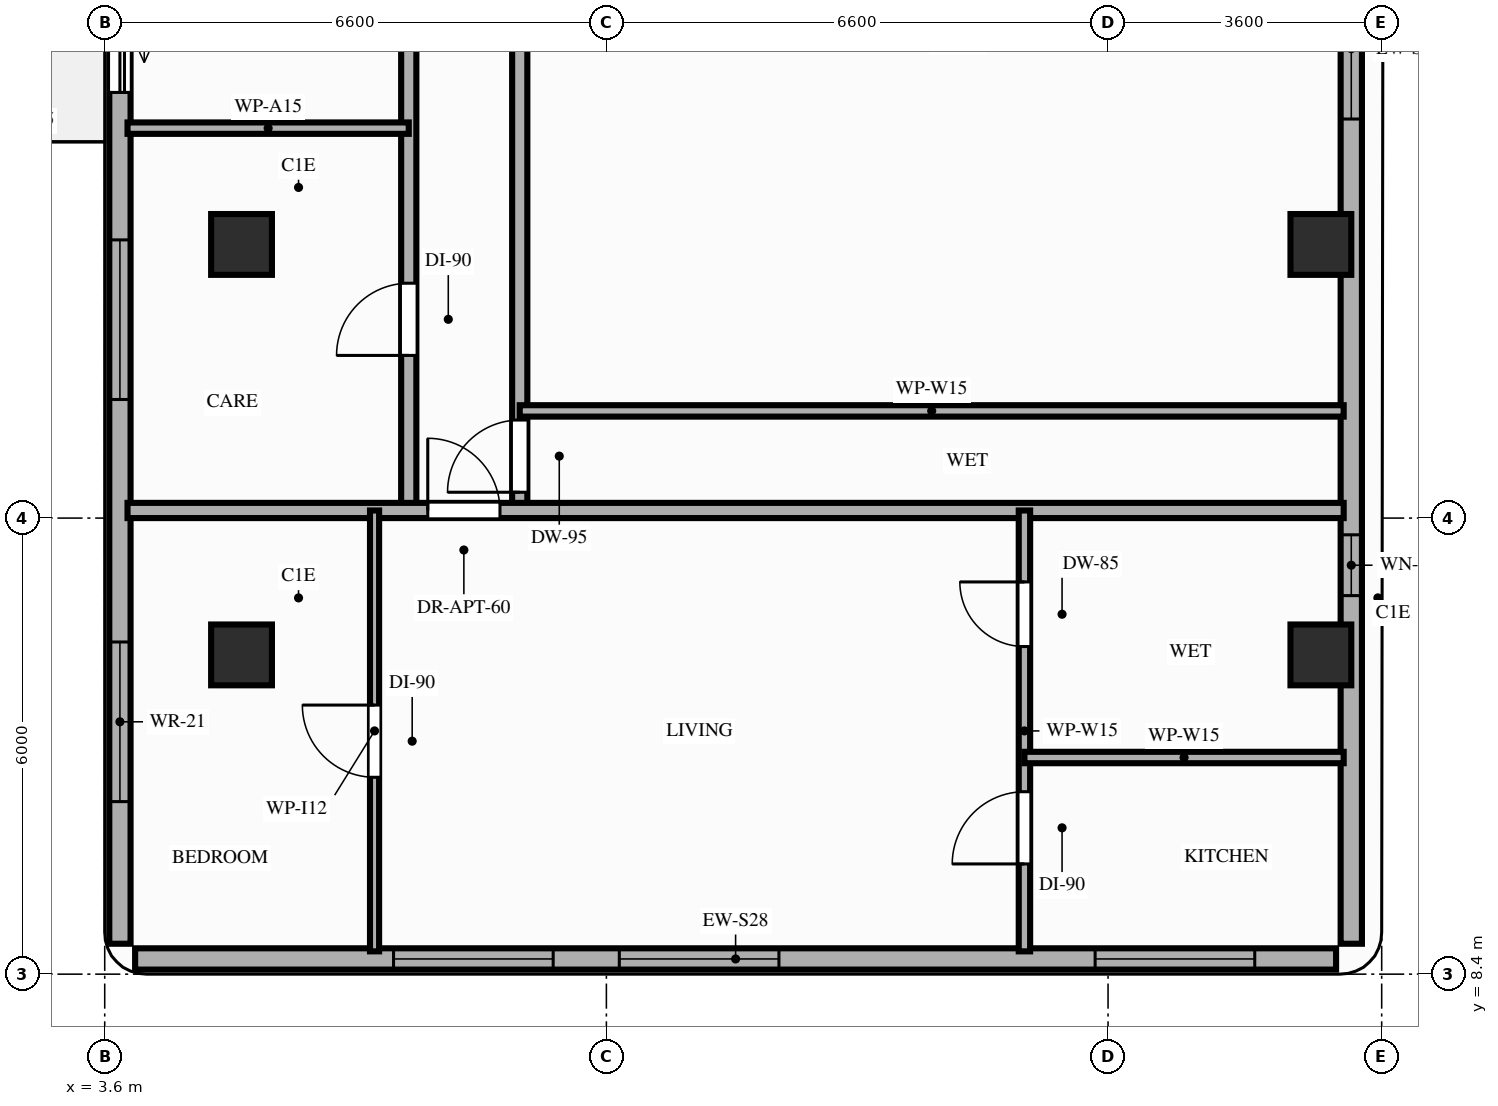
"""IFC4 building model, lengths in metres.
Left out: names, types, materials, properties, quantities, classifications, styles, units other than length and angle.
Written with IfcOpenShell. Run it as: python <this file> out.ifc"""

import sys

from ifc_helpers import new_model, si_unit, direction, frame, frame_2d, origin, origin_2d, place, context, subcontext, project, spatial, rectangle, extrude, element, fill, save


model = new_model("IFC4")
c1 = context("Model", 3, precision=1e-05, world=origin(), true_north=direction((0.0, 1.0)))
c2 = subcontext(c1, "Body", "Model", "MODEL_VIEW")
j1 = project(units=[si_unit("LENGTHUNIT", "METRE"), si_unit("PLANEANGLEUNIT", "RADIAN")], contexts=[c1])
p1 = place(None, origin())
s1 = spatial("IfcSite", under=j1, at=p1, CompositionType="ELEMENT")
p2 = place(p1, origin())
s2 = spatial("IfcBuilding", under=s1, at=p2, CompositionType="ELEMENT")
p3 = place(p2, frame((0.0, 0.0, 231.2)))
s3 = spatial("IfcBuildingStorey", under=s2, at=p3, CompositionType="ELEMENT", Elevation=231.2)
for number, where, z_axis, x_axis in (
    (1, (5.4, 12.6, 0.0), (0.0, 0.0, 1.0), (1.0, 0.0, 0.0)),
    (2, (19.6, 12.6, 0.0), (0.0, 0.0, 1.0), (1.0, 0.0, 0.0)),
    (3, (5.4, 18.0, 0.0), (0.0, 0.0, 1.0), (1.0, 0.0, 0.0)),
    (4, (19.6, 18.0, 0.0), (0.0, 0.0, 1.0), (1.0, 0.0, 0.0)),
):
    element("IfcColumn", number, at=place(p3, frame(where, z_axis=z_axis, x_axis=x_axis)), inside=s3, PredefinedType="COLUMN", context=c2, shape_type="SweptSolid", body=[
        extrude(rectangle(XDim=0.8, YDim=0.8, at=origin_2d()), origin(), (0.0, 0.0, 1.0), 3.2),
    ])
p4 = place(p3, frame((4.0, 8.6, 0.0), z_axis=(0.0, 0.0, 1.0), x_axis=(1.0, 0.0, 0.0)))
e5 = element("IfcWall", 5, at=p4, inside=s3, PredefinedType="STANDARD", context=c2, shape_type="SweptSolid", body=[
    extrude(rectangle(XDim=15.8, YDim=0.28, at=frame_2d((7.9, 0.0))), origin(), (0.0, 0.0, 1.0), 3.02),
])
p5 = place(p4, frame((6.37, 0.0, 0.85)))
e6 = element("IfcOpeningElement", 6, at=p5, cuts=e5, PredefinedType="OPENING", context=c2, shape_type="SweptSolid", body=[
    extrude(rectangle(XDim=2.1, YDim=1.8, at=frame_2d((1.05, 0.9))), frame((0.0, 0.15, 0.0), z_axis=(0.0, -1.0, 0.0), x_axis=(1.0, 0.0, 0.0)), (0.0, 0.0, 1.0), 0.3),
])
p6 = place(p4, frame((12.63, 0.0, 0.85)))
e7 = element("IfcOpeningElement", 7, at=p6, cuts=e5, PredefinedType="OPENING", context=c2, shape_type="SweptSolid", body=[
    extrude(rectangle(XDim=2.1, YDim=1.8, at=frame_2d((1.05, 0.9))), frame((0.0, 0.15, 0.0), z_axis=(0.0, -1.0, 0.0), x_axis=(1.0, 0.0, 0.0)), (0.0, 0.0, 1.0), 0.3),
])
p7 = place(p4, frame((3.4, 0.0, 0.85)))
e8 = element("IfcOpeningElement", 8, at=p7, cuts=e5, PredefinedType="OPENING", context=c2, shape_type="SweptSolid", body=[
    extrude(rectangle(XDim=2.1, YDim=1.8, at=frame_2d((1.05, 0.9))), frame((0.0, 0.15, 0.0), z_axis=(0.0, -1.0, 0.0), x_axis=(1.0, 0.0, 0.0)), (0.0, 0.0, 1.0), 0.3),
])
p8 = place(p3, frame((3.8, 42.1, 0.0), z_axis=(0.0, 0.0, 1.0), x_axis=(0.0, -1.0, 0.0)))
e9 = element("IfcWall", 9, at=p8, inside=s3, PredefinedType="STANDARD", context=c2, shape_type="SweptSolid", body=[
    extrude(rectangle(XDim=33.3, YDim=0.28, at=frame_2d((16.65, 0.0))), origin(), (0.0, 0.0, 1.0), 2.71),
])
p9 = place(p8, frame((20.7, 0.0, 0.0)))
e10 = element("IfcOpeningElement", 10, at=p9, cuts=e9, PredefinedType="OPENING", context=c2, shape_type="SweptSolid", body=[
    extrude(rectangle(XDim=1.4, YDim=2.1, at=frame_2d((0.7, 1.05))), frame((0.0, 0.15, 0.0), z_axis=(0.0, -1.0, 0.0), x_axis=(1.0, 0.0, 0.0)), (0.0, 0.0, 1.0), 0.3),
])
p10 = place(p8, frame((29.33, 0.0, 0.85)))
e11 = element("IfcOpeningElement", 11, at=p10, cuts=e9, PredefinedType="OPENING", context=c2, shape_type="SweptSolid", body=[
    extrude(rectangle(XDim=2.1, YDim=1.61, at=frame_2d((1.05, 0.805))), frame((0.0, 0.15, 0.0), z_axis=(0.0, -1.0, 0.0), x_axis=(1.0, 0.0, 0.0)), (0.0, 0.0, 1.0), 0.3),
])
p11 = place(p8, frame((24.04, 0.0, 0.85)))
e12 = element("IfcOpeningElement", 12, at=p11, cuts=e9, PredefinedType="OPENING", context=c2, shape_type="SweptSolid", body=[
    extrude(rectangle(XDim=2.1, YDim=1.61, at=frame_2d((1.05, 0.805))), frame((0.0, 0.15, 0.0), z_axis=(0.0, -1.0, 0.0), x_axis=(1.0, 0.0, 0.0)), (0.0, 0.0, 1.0), 0.3),
])
p12 = place(p8, frame((14.95, 0.0, 0.85)))
e13 = element("IfcOpeningElement", 13, at=p12, cuts=e9, PredefinedType="OPENING", context=c2, shape_type="SweptSolid", body=[
    extrude(rectangle(XDim=2.1, YDim=1.61, at=frame_2d((1.05, 0.805))), frame((0.0, 0.15, 0.0), z_axis=(0.0, -1.0, 0.0), x_axis=(1.0, 0.0, 0.0)), (0.0, 0.0, 1.0), 0.3),
])
p13 = place(p8, frame((9.75, 0.0, 0.85)))
e14 = element("IfcOpeningElement", 14, at=p13, cuts=e9, PredefinedType="OPENING", context=c2, shape_type="SweptSolid", body=[
    extrude(rectangle(XDim=2.1, YDim=1.61, at=frame_2d((1.05, 0.805))), frame((0.0, 0.15, 0.0), z_axis=(0.0, -1.0, 0.0), x_axis=(1.0, 0.0, 0.0)), (0.0, 0.0, 1.0), 0.3),
])
p14 = place(p8, frame((3.65, 0.0, 0.85)))
e15 = element("IfcOpeningElement", 15, at=p14, cuts=e9, PredefinedType="OPENING", context=c2, shape_type="SweptSolid", body=[
    extrude(rectangle(XDim=2.1, YDim=1.61, at=frame_2d((1.05, 0.805))), frame((0.0, 0.15, 0.0), z_axis=(0.0, -1.0, 0.0), x_axis=(1.0, 0.0, 0.0)), (0.0, 0.0, 1.0), 0.3),
])
p15 = place(p3, frame((20.0, 8.8, 0.0), z_axis=(0.0, 0.0, 1.0), x_axis=(0.0, 1.0, 0.0)))
e16 = element("IfcWall", 16, at=p15, inside=s3, PredefinedType="STANDARD", context=c2, shape_type="SweptSolid", body=[
    extrude(rectangle(XDim=23.55, YDim=0.28, at=frame_2d((11.775, 0.0))), origin(), (0.0, 0.0, 1.0), 2.56),
])
p16 = place(p15, frame((20.86, 0.0, 0.85)))
e17 = element("IfcOpeningElement", 17, at=p16, cuts=e16, PredefinedType="OPENING", context=c2, shape_type="SweptSolid", body=[
    extrude(rectangle(XDim=1.1, YDim=1.46, at=frame_2d((0.55, 0.73))), frame((0.0, 0.15, 0.0), z_axis=(0.0, -1.0, 0.0), x_axis=(1.0, 0.0, 0.0)), (0.0, 0.0, 1.0), 0.3),
])
p17 = place(p15, frame((4.58, 0.0, 0.85)))
e18 = element("IfcOpeningElement", 18, at=p17, cuts=e16, PredefinedType="OPENING", context=c2, shape_type="SweptSolid", body=[
    extrude(rectangle(XDim=0.8, YDim=1.46, at=frame_2d((0.4, 0.73))), frame((0.0, 0.15, 0.0), z_axis=(0.0, -1.0, 0.0), x_axis=(1.0, 0.0, 0.0)), (0.0, 0.0, 1.0), 0.3),
])
p18 = place(p15, frame((10.85, 0.0, 0.85)))
e19 = element("IfcOpeningElement", 19, at=p18, cuts=e16, PredefinedType="OPENING", context=c2, shape_type="SweptSolid", body=[
    extrude(rectangle(XDim=2.1, YDim=1.46, at=frame_2d((1.05, 0.73))), frame((0.0, 0.15, 0.0), z_axis=(0.0, -1.0, 0.0), x_axis=(1.0, 0.0, 0.0)), (0.0, 0.0, 1.0), 0.3),
])
p19 = place(p3, frame((7.6, 14.5, 0.0), z_axis=(0.0, 0.0, 1.0), x_axis=(0.0, 1.0, 0.0)))
e20 = element("IfcWall", 20, at=p19, inside=s3, PredefinedType="PARTITIONING", context=c2, shape_type="SweptSolid", body=[
    extrude(rectangle(XDim=13.6, YDim=0.2, at=frame_2d((6.8, 0.0))), origin(), (0.0, 0.0, 1.0), 2.56),
])
p20 = place(p19, frame((2.04, 0.0, 0.0)))
e21 = element("IfcOpeningElement", 21, at=p20, cuts=e20, PredefinedType="OPENING", context=c2, shape_type="SweptSolid", body=[
    extrude(rectangle(XDim=0.95, YDim=2.15, at=frame_2d((0.475, 1.075))), frame((0.0, 0.11, 0.0), z_axis=(0.0, -1.0, 0.0), x_axis=(1.0, 0.0, 0.0)), (0.0, 0.0, 1.0), 0.22),
])
p21 = place(p19, frame((8.84, 0.0, 0.0)))
e22 = element("IfcOpeningElement", 22, at=p21, cuts=e20, PredefinedType="OPENING", context=c2, shape_type="SweptSolid", body=[
    extrude(rectangle(XDim=0.95, YDim=2.15, at=frame_2d((0.475, 1.075))), frame((0.0, 0.11, 0.0), z_axis=(0.0, -1.0, 0.0), x_axis=(1.0, 0.0, 0.0)), (0.0, 0.0, 1.0), 0.22),
])
p22 = place(p3, frame((9.06, 14.5, 0.0), z_axis=(0.0, 0.0, 1.0), x_axis=(0.0, 1.0, 0.0)))
e23 = element("IfcWall", 23, at=p22, inside=s3, PredefinedType="PARTITIONING", context=c2, shape_type="SweptSolid", body=[
    extrude(rectangle(XDim=13.6, YDim=0.2, at=frame_2d((6.8, 0.0))), origin(), (0.0, 0.0, 1.0), 2.56),
])
p23 = place(p22, frame((0.24, 0.0, 0.0)))
e24 = element("IfcOpeningElement", 24, at=p23, cuts=e23, PredefinedType="OPENING", context=c2, shape_type="SweptSolid", body=[
    extrude(rectangle(XDim=0.95, YDim=2.1, at=frame_2d((0.475, 1.05))), frame((0.0, 0.11, 0.0), z_axis=(0.0, -1.0, 0.0), x_axis=(1.0, 0.0, 0.0)), (0.0, 0.0, 1.0), 0.22),
])
p24 = place(p22, frame((6.98, 0.0, 0.0)))
e25 = element("IfcOpeningElement", 25, at=p24, cuts=e23, PredefinedType="OPENING", context=c2, shape_type="SweptSolid", body=[
    extrude(rectangle(XDim=0.95, YDim=2.15, at=frame_2d((0.475, 1.075))), frame((0.0, 0.11, 0.0), z_axis=(0.0, -1.0, 0.0), x_axis=(1.0, 0.0, 0.0)), (0.0, 0.0, 1.0), 0.22),
])
p25 = place(p3, frame((3.9, 14.5, 0.0), z_axis=(0.0, 0.0, 1.0), x_axis=(1.0, 0.0, 0.0)))
e26 = element("IfcWall", 26, at=p25, inside=s3, PredefinedType="PARTITIONING", context=c2, shape_type="SweptSolid", body=[
    extrude(rectangle(XDim=16.0, YDim=0.2, at=frame_2d((8.0, 0.0))), origin(), (0.0, 0.0, 1.0), 2.56),
])
p26 = place(p25, frame((3.95, 0.0, 0.0)))
e27 = element("IfcOpeningElement", 27, at=p26, cuts=e26, PredefinedType="OPENING", context=c2, shape_type="SweptSolid", body=[
    extrude(rectangle(XDim=0.95, YDim=2.15, at=frame_2d((0.475, 1.075))), frame((0.0, 0.11, 0.0), z_axis=(0.0, -1.0, 0.0), x_axis=(1.0, 0.0, 0.0)), (0.0, 0.0, 1.0), 0.22),
])
p27 = place(p3, frame((7.15, 8.7, 0.0), z_axis=(0.0, 0.0, 1.0), x_axis=(0.0, 1.0, 0.0)))
e28 = element("IfcWall", 28, at=p27, inside=s3, PredefinedType="PARTITIONING", context=c2, shape_type="SweptSolid", body=[
    extrude(rectangle(XDim=5.8, YDim=0.12, at=frame_2d((2.9, 0.0))), origin(), (0.0, 0.0, 1.0), 2.56),
])
p28 = place(p27, frame((2.29, 0.0, 0.0)))
e29 = element("IfcOpeningElement", 29, at=p28, cuts=e28, PredefinedType="OPENING", context=c2, shape_type="SweptSolid", body=[
    extrude(rectangle(XDim=0.95, YDim=2.15, at=frame_2d((0.475, 1.075))), frame((0.0, 0.07, 0.0), z_axis=(0.0, -1.0, 0.0), x_axis=(1.0, 0.0, 0.0)), (0.0, 0.0, 1.0), 0.14),
])
p29 = place(p3, frame((15.7, 8.7, 0.0), z_axis=(0.0, 0.0, 1.0), x_axis=(0.0, 1.0, 0.0)))
e30 = element("IfcWall", 30, at=p29, inside=s3, PredefinedType="PARTITIONING", context=c2, shape_type="SweptSolid", body=[
    extrude(rectangle(XDim=5.8, YDim=0.15, at=frame_2d((2.9, 0.0))), origin(), (0.0, 0.0, 1.0), 2.56),
])
p30 = place(p29, frame((1.15, 0.0, 0.0)))
e31 = element("IfcOpeningElement", 31, at=p30, cuts=e30, PredefinedType="OPENING", context=c2, shape_type="SweptSolid", body=[
    extrude(rectangle(XDim=0.95, YDim=2.15, at=frame_2d((0.475, 1.075))), frame((0.0, 0.085, 0.0), z_axis=(0.0, -1.0, 0.0), x_axis=(1.0, 0.0, 0.0)), (0.0, 0.0, 1.0), 0.17),
])
p31 = place(p29, frame((4.01, 0.0, 0.0)))
e32 = element("IfcOpeningElement", 32, at=p31, cuts=e30, PredefinedType="OPENING", context=c2, shape_type="SweptSolid", body=[
    extrude(rectangle(XDim=0.85, YDim=2.1, at=frame_2d((0.425, 1.05))), frame((0.0, 0.085, 0.0), z_axis=(0.0, -1.0, 0.0), x_axis=(1.0, 0.0, 0.0)), (0.0, 0.0, 1.0), 0.17),
])
p32 = place(p3, frame((15.7, 11.25, 0.0), z_axis=(0.0, 0.0, 1.0), x_axis=(1.0, 0.0, 0.0)))
e33 = element("IfcWall", 33, at=p32, inside=s3, PredefinedType="PARTITIONING", context=c2, shape_type="SweptSolid", body=[
    extrude(rectangle(XDim=4.2, YDim=0.15, at=frame_2d((2.1, 0.0))), origin(), (0.0, 0.0, 1.0), 3.02),
])
p33 = place(p3, frame((3.9, 19.53, 0.0), z_axis=(0.0, 0.0, 1.0), x_axis=(1.0, 0.0, 0.0)))
e34 = element("IfcWall", 34, at=p33, inside=s3, PredefinedType="PARTITIONING", context=c2, shape_type="SweptSolid", body=[
    extrude(rectangle(XDim=3.7, YDim=0.15, at=frame_2d((1.85, 0.0))), origin(), (0.0, 0.0, 1.0), 2.56),
])
p34 = place(p3, frame((9.06, 15.81, 0.0), z_axis=(0.0, 0.0, 1.0), x_axis=(1.0, 0.0, 0.0)))
e35 = element("IfcWall", 35, at=p34, inside=s3, PredefinedType="PARTITIONING", context=c2, shape_type="SweptSolid", body=[
    extrude(rectangle(XDim=10.84, YDim=0.15, at=frame_2d((5.42, 0.0))), origin(), (0.0, 0.0, 1.0), 2.56),
])
p35 = place(p9, origin())
e36 = element("IfcDoor", 36, at=p35, inside=s3, OperationType="SLIDING_TO_RIGHT", PredefinedType="DOOR", context=c2, shape_type="SweptSolid", body=[
    extrude(rectangle(XDim=1.4, YDim=2.1, at=frame_2d((0.7, 1.05))), frame((0.0, 0.025, 0.0), z_axis=(0.0, -1.0, 0.0), x_axis=(1.0, 0.0, 0.0)), (0.0, 0.0, 1.0), 0.05),
])
fill(e10, e36)
p36 = place(p10, origin())
e37 = element("IfcWindow", 37, at=p36, inside=s3, PartitioningType="SINGLE_PANEL", PredefinedType="WINDOW", context=c2, shape_type="SweptSolid", body=[
    extrude(rectangle(XDim=2.1, YDim=1.61, at=frame_2d((1.05, 0.805))), frame((0.0, 0.03, 0.0), z_axis=(0.0, -1.0, 0.0), x_axis=(1.0, 0.0, 0.0)), (0.0, 0.0, 1.0), 0.06),
])
fill(e11, e37)
p37 = place(p5, origin())
e38 = element("IfcWindow", 38, at=p37, inside=s3, PartitioningType="SINGLE_PANEL", PredefinedType="WINDOW", context=c2, shape_type="SweptSolid", body=[
    extrude(rectangle(XDim=2.1, YDim=1.8, at=frame_2d((1.05, 0.9))), frame((0.0, 0.03, 0.0), z_axis=(0.0, -1.0, 0.0), x_axis=(1.0, 0.0, 0.0)), (0.0, 0.0, 1.0), 0.06),
])
fill(e6, e38)
p38 = place(p6, origin())
e39 = element("IfcWindow", 39, at=p38, inside=s3, PartitioningType="SINGLE_PANEL", PredefinedType="WINDOW", context=c2, shape_type="SweptSolid", body=[
    extrude(rectangle(XDim=2.1, YDim=1.8, at=frame_2d((1.05, 0.9))), frame((0.0, 0.03, 0.0), z_axis=(0.0, -1.0, 0.0), x_axis=(1.0, 0.0, 0.0)), (0.0, 0.0, 1.0), 0.06),
])
fill(e7, e39)
p39 = place(p17, origin())
e40 = element("IfcWindow", 40, at=p39, inside=s3, PartitioningType="SINGLE_PANEL", PredefinedType="WINDOW", context=c2, shape_type="SweptSolid", body=[
    extrude(rectangle(XDim=0.8, YDim=1.46, at=frame_2d((0.4, 0.73))), frame((0.0, 0.03, 0.0), z_axis=(0.0, -1.0, 0.0), x_axis=(1.0, 0.0, 0.0)), (0.0, 0.0, 1.0), 0.06),
])
fill(e18, e40)
p40 = place(p11, origin())
e41 = element("IfcWindow", 41, at=p40, inside=s3, PartitioningType="SINGLE_PANEL", PredefinedType="WINDOW", context=c2, shape_type="SweptSolid", body=[
    extrude(rectangle(XDim=2.1, YDim=1.61, at=frame_2d((1.05, 0.805))), frame((0.0, 0.03, 0.0), z_axis=(0.0, -1.0, 0.0), x_axis=(1.0, 0.0, 0.0)), (0.0, 0.0, 1.0), 0.06),
])
fill(e12, e41)
p41 = place(p18, origin())
e42 = element("IfcWindow", 42, at=p41, inside=s3, PartitioningType="SINGLE_PANEL", PredefinedType="WINDOW", context=c2, shape_type="SweptSolid", body=[
    extrude(rectangle(XDim=2.1, YDim=1.46, at=frame_2d((1.05, 0.73))), frame((0.0, 0.03, 0.0), z_axis=(0.0, -1.0, 0.0), x_axis=(1.0, 0.0, 0.0)), (0.0, 0.0, 1.0), 0.06),
])
fill(e19, e42)
p42 = place(p7, origin())
e43 = element("IfcWindow", 43, at=p42, inside=s3, PartitioningType="SINGLE_PANEL", PredefinedType="WINDOW", context=c2, shape_type="SweptSolid", body=[
    extrude(rectangle(XDim=2.1, YDim=1.8, at=frame_2d((1.05, 0.9))), frame((0.0, 0.03, 0.0), z_axis=(0.0, -1.0, 0.0), x_axis=(1.0, 0.0, 0.0)), (0.0, 0.0, 1.0), 0.06),
])
fill(e8, e43)
p43 = place(p26, origin())
e44 = element("IfcDoor", 44, at=p43, inside=s3, OperationType="SINGLE_SWING_LEFT", PredefinedType="DOOR", context=c2, shape_type="SweptSolid", body=[
    extrude(rectangle(XDim=0.95, YDim=2.15, at=frame_2d((0.475, 1.075))), frame((0.0, 0.025, 0.0), z_axis=(0.0, -1.0, 0.0), x_axis=(1.0, 0.0, 0.0)), (0.0, 0.0, 1.0), 0.05),
])
fill(e27, e44)
p44 = place(p28, origin())
e45 = element("IfcDoor", 45, at=p44, inside=s3, OperationType="SINGLE_SWING_RIGHT", PredefinedType="DOOR", context=c2, shape_type="SweptSolid", body=[
    extrude(rectangle(XDim=0.95, YDim=2.15, at=frame_2d((0.475, 1.075))), frame((0.0, 0.025, 0.0), z_axis=(0.0, -1.0, 0.0), x_axis=(1.0, 0.0, 0.0)), (0.0, 0.0, 1.0), 0.05),
])
fill(e29, e45)
p45 = place(p30, origin())
e46 = element("IfcDoor", 46, at=p45, inside=s3, OperationType="SINGLE_SWING_LEFT", PredefinedType="DOOR", context=c2, shape_type="SweptSolid", body=[
    extrude(rectangle(XDim=0.95, YDim=2.15, at=frame_2d((0.475, 1.075))), frame((0.0, 0.025, 0.0), z_axis=(0.0, -1.0, 0.0), x_axis=(1.0, 0.0, 0.0)), (0.0, 0.0, 1.0), 0.05),
])
fill(e31, e46)
p46 = place(p31, origin())
e47 = element("IfcDoor", 47, at=p46, inside=s3, OperationType="SINGLE_SWING_RIGHT", PredefinedType="DOOR", context=c2, shape_type="SweptSolid", body=[
    extrude(rectangle(XDim=0.85, YDim=2.1, at=frame_2d((0.425, 1.05))), frame((0.0, 0.025, 0.0), z_axis=(0.0, -1.0, 0.0), x_axis=(1.0, 0.0, 0.0)), (0.0, 0.0, 1.0), 0.05),
])
fill(e32, e47)
p47 = place(p20, origin())
e48 = element("IfcDoor", 48, at=p47, inside=s3, OperationType="SINGLE_SWING_LEFT", PredefinedType="DOOR", context=c2, shape_type="SweptSolid", body=[
    extrude(rectangle(XDim=0.95, YDim=2.15, at=frame_2d((0.475, 1.075))), frame((0.0, 0.025, 0.0), z_axis=(0.0, -1.0, 0.0), x_axis=(1.0, 0.0, 0.0)), (0.0, 0.0, 1.0), 0.05),
])
fill(e21, e48)
p48 = place(p23, origin())
e49 = element("IfcDoor", 49, at=p48, inside=s3, OperationType="SINGLE_SWING_LEFT", PredefinedType="DOOR", context=c2, shape_type="SweptSolid", body=[
    extrude(rectangle(XDim=0.95, YDim=2.1, at=frame_2d((0.475, 1.05))), frame((0.0, 0.025, 0.0), z_axis=(0.0, -1.0, 0.0), x_axis=(1.0, 0.0, 0.0)), (0.0, 0.0, 1.0), 0.05),
])
fill(e24, e49)
save(model, sys.argv[1])
